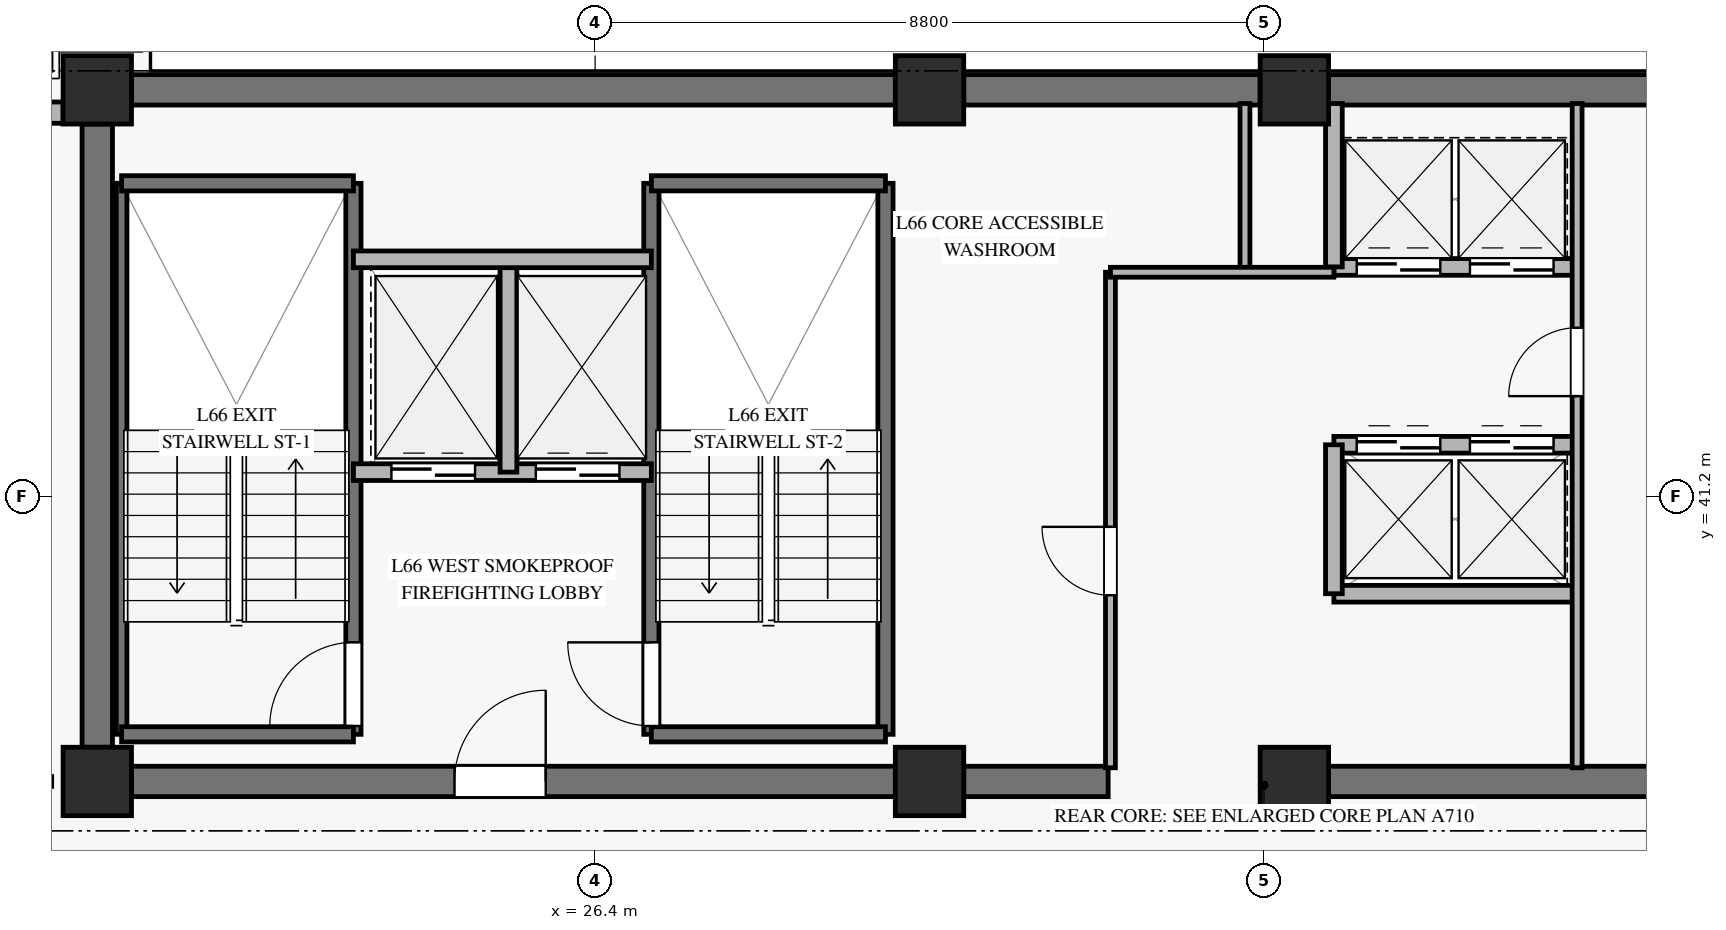
"""IFC4 building model, lengths in metres.
Left out: names, types, materials, properties, quantities, classifications, styles, units other than length and angle.
Written with IfcOpenShell. Run it as: python <this file> out.ifc"""

import sys

from ifc_helpers import new_model, si_unit, direction, frame, frame_2d, origin, origin_2d, place, context, subcontext, project, spatial, rectangle, extrude, source, transform, mapped, element, fill, save


model = new_model("IFC4")
c1 = context("Model", 3, precision=1e-05, world=origin(), true_north=direction((0.0, 1.0)))
c2 = subcontext(c1, "Body", "Model", "MODEL_VIEW")
j1 = project(units=[si_unit("LENGTHUNIT", "METRE"), si_unit("PLANEANGLEUNIT", "RADIAN")], contexts=[c1])
p1 = place(None, origin())
s1 = spatial("IfcSite", under=j1, at=p1, CompositionType="ELEMENT")
p2 = place(p1, origin())
s2 = spatial("IfcBuilding", under=s1, at=p2, CompositionType="ELEMENT")
p3 = place(p2, frame((0.0, 0.0, 258.7)))
s3 = spatial("IfcBuildingStorey", under=s2, at=p3, CompositionType="ELEMENT", Elevation=258.7)
m1 = source(origin(), c2, "Body", "SweptSolid", [
    extrude(rectangle(XDim=0.9, YDim=0.9, at=origin_2d()), origin(), (0.0, 0.0, 1.0), 3.185),
])
for number, where, z_axis, x_axis in (
    (1, (19.85, 37.45, 0.0), (0.0, 0.0, 1.0), (1.0, 0.0, 0.0)),
    (2, (19.85, 46.55, 0.0), (0.0, 0.0, 1.0), (1.0, 0.0, 0.0)),
    (3, (30.8, 37.45, 0.0), (0.0, 0.0, 1.0), (1.0, 0.0, 0.0)),
    (4, (30.8, 46.55, 0.0), (0.0, 0.0, 1.0), (1.0, 0.0, 0.0)),
    (5, (35.6, 37.45, 0.0), (0.0, 0.0, 1.0), (1.0, 0.0, 0.0)),
    (6, (35.6, 46.55, 0.0), (0.0, 0.0, 1.0), (1.0, 0.0, 0.0)),
):
    element("IfcColumn", number, at=place(p3, frame(where, z_axis=z_axis, x_axis=x_axis)), inside=s3, PredefinedType="PILASTER", context=c2, shape_type="MappedRepresentation", body=[
        mapped(m1, transform((0.0, 0.0, 0.0), x_axis=(1.0, 0.0, 0.0), y_axis=(0.0, 1.0, 0.0), z_axis=(0.0, 0.0, 1.0), scale=1.0)),
    ])
p4 = place(p3, frame((20.3, 46.55, 0.0), z_axis=(0.0, 0.0, 1.0), x_axis=(1.0, 0.0, 0.0)))
e7 = element("IfcWall", 7, at=p4, inside=s3, PredefinedType="SHEAR", context=c2, shape_type="SweptSolid", body=[
    extrude(rectangle(XDim=10.05, YDim=0.4, at=frame_2d((5.025, 0.0))), origin(), (0.0, 0.0, 1.0), 3.185),
])
p5 = place(p3, frame((31.25, 46.55, 0.0), z_axis=(0.0, 0.0, 1.0), x_axis=(1.0, 0.0, 0.0)))
e8 = element("IfcWall", 8, at=p5, inside=s3, PredefinedType="SHEAR", context=c2, shape_type="SweptSolid", body=[
    extrude(rectangle(XDim=3.9, YDim=0.4, at=frame_2d((1.95, 0.0))), origin(), (0.0, 0.0, 1.0), 3.185),
])
p6 = place(p3, frame((36.05, 46.55, 0.0), z_axis=(0.0, 0.0, 1.0), x_axis=(1.0, 0.0, 0.0)))
e9 = element("IfcWall", 9, at=p6, inside=s3, PredefinedType="SHEAR", context=c2, shape_type="SweptSolid", body=[
    extrude(rectangle(XDim=7.8, YDim=0.4, at=frame_2d((3.9, 0.0))), origin(), (0.0, 0.0, 1.0), 3.185),
])
p7 = place(p3, frame((20.3, 37.45, 0.0), z_axis=(0.0, 0.0, 1.0), x_axis=(1.0, 0.0, 0.0)))
e10 = element("IfcWall", 10, at=p7, inside=s3, PredefinedType="SHEAR", context=c2, shape_type="SweptSolid", body=[
    extrude(rectangle(XDim=10.05, YDim=0.4, at=frame_2d((5.025, 0.0))), origin(), (0.0, 0.0, 1.0), 3.185),
])
p8 = place(p7, frame((4.25, 0.0, 0.0)))
e11 = element("IfcOpeningElement", 11, at=p8, cuts=e10, PredefinedType="OPENING", context=c2, shape_type="SweptSolid", body=[
    extrude(rectangle(XDim=1.2, YDim=2.15, at=frame_2d((0.6, 1.075))), frame((0.0, 0.21, 0.0), z_axis=(0.0, -1.0, 0.0), x_axis=(1.0, 0.0, 0.0)), (0.0, 0.0, 1.0), 0.42),
])
p9 = place(p3, frame((31.25, 37.45, 0.0), z_axis=(0.0, 0.0, 1.0), x_axis=(1.0, 0.0, 0.0)))
e12 = element("IfcWall", 12, at=p9, inside=s3, PredefinedType="SHEAR", context=c2, shape_type="SweptSolid", body=[
    extrude(rectangle(XDim=1.9, YDim=0.4, at=frame_2d((0.95, 0.0))), origin(), (0.0, 0.0, 1.0), 3.185),
])
p10 = place(p3, frame((36.05, 37.45, 0.0), z_axis=(0.0, 0.0, 1.0), x_axis=(1.0, 0.0, 0.0)))
e13 = element("IfcWall", 13, at=p10, inside=s3, PredefinedType="SHEAR", context=c2, shape_type="SweptSolid", body=[
    extrude(rectangle(XDim=7.8, YDim=0.4, at=frame_2d((3.9, 0.0))), origin(), (0.0, 0.0, 1.0), 3.185),
])
p11 = place(p3, frame((19.85, 37.9, 0.0), z_axis=(0.0, 0.0, 1.0), x_axis=(0.0, 1.0, 0.0)))
e14 = element("IfcWall", 14, at=p11, inside=s3, PredefinedType="SHEAR", context=c2, shape_type="SweptSolid", body=[
    extrude(rectangle(XDim=8.2, YDim=0.4, at=frame_2d((4.1, 0.0))), origin(), (0.0, 0.0, 1.0), 3.185),
])
p12 = place(p3, frame((11.598, 46.25, 0.0), z_axis=(0.0, 0.0, 1.0), x_axis=(1.0, 0.0, 0.0)))
e15 = element("IfcWall", 15, at=p12, inside=s3, PredefinedType="SOLIDWALL", context=c2, shape_type="SweptSolid", body=[
    extrude(rectangle(XDim=7.802, YDim=0.28, at=frame_2d((3.901, 0.0))), origin(), (0.0, 0.0, 1.0), 2.815),
])
p13 = place(p12, frame((3.101, 0.0, 0.45)))
e16 = element("IfcOpeningElement", 16, at=p13, cuts=e15, PredefinedType="OPENING", context=c2, shape_type="SweptSolid", body=[
    extrude(rectangle(XDim=1.6, YDim=2.0, at=frame_2d((0.8, 1.0))), frame((0.0, 0.15, 0.0), z_axis=(0.0, -1.0, 0.0), x_axis=(1.0, 0.0, 0.0)), (0.0, 0.0, 1.0), 0.3),
])
p14 = place(p3, frame((20.17, 38.07, 0.0), z_axis=(0.0, 0.0, 1.0), x_axis=(0.0, 1.0, 0.0)))
e17 = element("IfcWall", 17, at=p14, inside=s3, PredefinedType="SOLIDWALL", context=c2, shape_type="SweptSolid", body=[
    extrude(rectangle(XDim=7.25, YDim=0.14, at=frame_2d((3.625, 0.0))), origin(), (0.0, 0.0, 1.0), 3.4),
])
p15 = place(p3, frame((23.22, 38.07, 0.0), z_axis=(0.0, 0.0, 1.0), x_axis=(0.0, 1.0, 0.0)))
e18 = element("IfcWall", 18, at=p15, inside=s3, PredefinedType="SOLIDWALL", context=c2, shape_type="SweptSolid", body=[
    extrude(rectangle(XDim=7.25, YDim=0.2, at=frame_2d((3.625, 0.0))), origin(), (0.0, 0.0, 1.0), 3.4),
])
p16 = place(p15, frame((0.11, 0.0, 0.0)))
e19 = element("IfcOpeningElement", 19, at=p16, cuts=e18, PredefinedType="OPENING", context=c2, shape_type="SweptSolid", body=[
    extrude(rectangle(XDim=1.1, YDim=2.15, at=frame_2d((0.55, 1.075))), frame((0.0, 0.11, 0.0), z_axis=(0.0, -1.0, 0.0), x_axis=(1.0, 0.0, 0.0)), (0.0, 0.0, 1.0), 0.22),
])
for number, where, z_axis, x_axis in (
    (20, (20.17, 45.32, 0.0), (0.0, 0.0, 1.0), (1.0, 0.0, 0.0)),
    (21, (20.17, 38.07, 0.0), (0.0, 0.0, 1.0), (1.0, 0.0, 0.0)),
):
    element("IfcWall", number, at=place(p3, frame(where, z_axis=z_axis, x_axis=x_axis)), inside=s3, PredefinedType="SOLIDWALL", context=c2, shape_type="SweptSolid", body=[
        extrude(rectangle(XDim=3.05, YDim=0.2, at=frame_2d((1.525, 0.0))), origin(), (0.0, 0.0, 1.0), 3.4),
    ])
p17 = place(p3, frame((27.14, 38.07, 0.0), z_axis=(0.0, 0.0, 1.0), x_axis=(0.0, 1.0, 0.0)))
e22 = element("IfcWall", 22, at=p17, inside=s3, PredefinedType="SOLIDWALL", context=c2, shape_type="SweptSolid", body=[
    extrude(rectangle(XDim=7.25, YDim=0.2, at=frame_2d((3.625, 0.0))), origin(), (0.0, 0.0, 1.0), 3.4),
])
p18 = place(p17, frame((0.11, 0.0, 0.0)))
e23 = element("IfcOpeningElement", 23, at=p18, cuts=e22, PredefinedType="OPENING", context=c2, shape_type="SweptSolid", body=[
    extrude(rectangle(XDim=1.1, YDim=2.15, at=frame_2d((0.55, 1.075))), frame((0.0, 0.11, 0.0), z_axis=(0.0, -1.0, 0.0), x_axis=(1.0, 0.0, 0.0)), (0.0, 0.0, 1.0), 0.22),
])
p19 = place(p3, frame((30.22, 38.07, 0.0), z_axis=(0.0, 0.0, 1.0), x_axis=(0.0, 1.0, 0.0)))
e24 = element("IfcWall", 24, at=p19, inside=s3, PredefinedType="SOLIDWALL", context=c2, shape_type="SweptSolid", body=[
    extrude(rectangle(XDim=7.25, YDim=0.2, at=frame_2d((3.625, 0.0))), origin(), (0.0, 0.0, 1.0), 3.4),
])
for number, where, z_axis, x_axis in (
    (25, (27.14, 45.32, 0.0), (0.0, 0.0, 1.0), (1.0, 0.0, 0.0)),
    (26, (27.14, 38.07, 0.0), (0.0, 0.0, 1.0), (1.0, 0.0, 0.0)),
):
    element("IfcWall", number, at=place(p3, frame(where, z_axis=z_axis, x_axis=x_axis)), inside=s3, PredefinedType="SOLIDWALL", context=c2, shape_type="SweptSolid", body=[
        extrude(rectangle(XDim=3.08, YDim=0.2, at=frame_2d((1.54, 0.0))), origin(), (0.0, 0.0, 1.0), 3.4),
    ])
p20 = place(p3, frame((23.22, 41.52, 0.0), z_axis=(0.0, 0.0, 1.0), x_axis=(1.0, 0.0, 0.0)))
e27 = element("IfcWall", 27, at=p20, inside=s3, PredefinedType="SOLIDWALL", context=c2, shape_type="SweptSolid", body=[
    extrude(rectangle(XDim=3.92, YDim=0.22, at=frame_2d((1.96, 0.0))), origin(), (0.0, 0.0, 1.0), 3.185),
])
p21 = place(p20, frame((0.5, 0.0, 0.0)))
e28 = element("IfcOpeningElement", 28, at=p21, cuts=e27, PredefinedType="OPENING", context=c2, shape_type="SweptSolid", body=[
    extrude(rectangle(XDim=1.1, YDim=2.2, at=frame_2d((0.55, 1.1))), frame((0.0, 0.12, 0.0), z_axis=(0.0, -1.0, 0.0), x_axis=(1.0, 0.0, 0.0)), (0.0, 0.0, 1.0), 0.24),
])
p22 = place(p20, frame((2.4, 0.0, 0.0)))
e29 = element("IfcOpeningElement", 29, at=p22, cuts=e27, PredefinedType="OPENING", context=c2, shape_type="SweptSolid", body=[
    extrude(rectangle(XDim=1.1, YDim=2.2, at=frame_2d((0.55, 1.1))), frame((0.0, 0.12, 0.0), z_axis=(0.0, -1.0, 0.0), x_axis=(1.0, 0.0, 0.0)), (0.0, 0.0, 1.0), 0.24),
])
p23 = place(p3, frame((25.26, 41.52, 0.0), z_axis=(0.0, 0.0, 1.0), x_axis=(0.0, 1.0, 0.0)))
e30 = element("IfcWall", 30, at=p23, inside=s3, PredefinedType="SOLIDWALL", context=c2, shape_type="SweptSolid", body=[
    extrude(rectangle(XDim=2.8, YDim=0.22, at=frame_2d((1.4, 0.0))), origin(), (0.0, 0.0, 1.0), 3.185),
])
p24 = place(p3, frame((23.22, 44.32, 0.0), z_axis=(0.0, 0.0, 1.0), x_axis=(1.0, 0.0, 0.0)))
e31 = element("IfcWall", 31, at=p24, inside=s3, PredefinedType="SOLIDWALL", context=c2, shape_type="SweptSolid", body=[
    extrude(rectangle(XDim=3.92, YDim=0.22, at=frame_2d((1.96, 0.0))), origin(), (0.0, 0.0, 1.0), 3.185),
])
p25 = place(p3, frame((36.12, 44.22, 0.0), z_axis=(0.0, 0.0, 1.0), x_axis=(1.0, 0.0, 0.0)))
e32 = element("IfcWall", 32, at=p25, inside=s3, PredefinedType="SOLIDWALL", context=c2, shape_type="SweptSolid", body=[
    extrude(rectangle(XDim=3.2, YDim=0.22, at=frame_2d((1.6, 0.0))), origin(), (0.0, 0.0, 1.0), 3.185),
])
p26 = place(p25, frame((0.3, 0.0, 0.0)))
e33 = element("IfcOpeningElement", 33, at=p26, cuts=e32, PredefinedType="OPENING", context=c2, shape_type="SweptSolid", body=[
    extrude(rectangle(XDim=1.1, YDim=2.2, at=frame_2d((0.55, 1.1))), frame((0.0, 0.12, 0.0), z_axis=(0.0, -1.0, 0.0), x_axis=(1.0, 0.0, 0.0)), (0.0, 0.0, 1.0), 0.24),
])
p27 = place(p25, frame((1.79, 0.0, 0.0)))
e34 = element("IfcOpeningElement", 34, at=p27, cuts=e32, PredefinedType="OPENING", context=c2, shape_type="SweptSolid", body=[
    extrude(rectangle(XDim=1.1, YDim=2.2, at=frame_2d((0.55, 1.1))), frame((0.0, 0.12, 0.0), z_axis=(0.0, -1.0, 0.0), x_axis=(1.0, 0.0, 0.0)), (0.0, 0.0, 1.0), 0.24),
])
p28 = place(p3, frame((36.12, 41.88, 0.0), z_axis=(0.0, 0.0, 1.0), x_axis=(1.0, 0.0, 0.0)))
e35 = element("IfcWall", 35, at=p28, inside=s3, PredefinedType="SOLIDWALL", context=c2, shape_type="SweptSolid", body=[
    extrude(rectangle(XDim=3.2, YDim=0.22, at=frame_2d((1.6, 0.0))), origin(), (0.0, 0.0, 1.0), 3.185),
])
p29 = place(p28, frame((0.3, 0.0, 0.0)))
e36 = element("IfcOpeningElement", 36, at=p29, cuts=e35, PredefinedType="OPENING", context=c2, shape_type="SweptSolid", body=[
    extrude(rectangle(XDim=1.1, YDim=2.2, at=frame_2d((0.55, 1.1))), frame((0.0, 0.12, 0.0), z_axis=(0.0, -1.0, 0.0), x_axis=(1.0, 0.0, 0.0)), (0.0, 0.0, 1.0), 0.24),
])
p30 = place(p28, frame((1.79, 0.0, 0.0)))
e37 = element("IfcOpeningElement", 37, at=p30, cuts=e35, PredefinedType="OPENING", context=c2, shape_type="SweptSolid", body=[
    extrude(rectangle(XDim=1.1, YDim=2.2, at=frame_2d((0.55, 1.1))), frame((0.0, 0.12, 0.0), z_axis=(0.0, -1.0, 0.0), x_axis=(1.0, 0.0, 0.0)), (0.0, 0.0, 1.0), 0.24),
])
p31 = place(p3, frame((36.12, 39.92, 0.0), z_axis=(0.0, 0.0, 1.0), x_axis=(1.0, 0.0, 0.0)))
e38 = element("IfcWall", 38, at=p31, inside=s3, PredefinedType="SOLIDWALL", context=c2, shape_type="SweptSolid", body=[
    extrude(rectangle(XDim=3.2, YDim=0.22, at=frame_2d((1.6, 0.0))), origin(), (0.0, 0.0, 1.0), 3.185),
])
p32 = place(p3, frame((36.12, 39.92, 0.0), z_axis=(0.0, 0.0, 1.0), x_axis=(0.0, 1.0, 0.0)))
e39 = element("IfcWall", 39, at=p32, inside=s3, PredefinedType="SOLIDWALL", context=c2, shape_type="SweptSolid", body=[
    extrude(rectangle(XDim=1.96, YDim=0.22, at=frame_2d((0.98, 0.0))), origin(), (0.0, 0.0, 1.0), 3.185),
])
p33 = place(p3, frame((36.12, 44.22, 0.0), z_axis=(0.0, 0.0, 1.0), x_axis=(0.0, 1.0, 0.0)))
e40 = element("IfcWall", 40, at=p33, inside=s3, PredefinedType="SOLIDWALL", context=c2, shape_type="SweptSolid", body=[
    extrude(rectangle(XDim=2.15, YDim=0.22, at=frame_2d((1.075, 0.0))), origin(), (0.0, 0.0, 1.0), 3.185),
])
p34 = place(p3, frame((33.18, 37.63, 0.0), z_axis=(0.0, 0.0, 1.0), x_axis=(0.0, 1.0, 0.0)))
e41 = element("IfcWall", 41, at=p34, inside=s3, PredefinedType="PARTITIONING", context=c2, shape_type="SweptSolid", body=[
    extrude(rectangle(XDim=6.52, YDim=0.13, at=frame_2d((3.26, 0.0))), origin(), (0.0, 0.0, 1.0), 2.27),
])
p35 = place(p34, frame((2.27, 0.0, 0.0)))
e42 = element("IfcOpeningElement", 42, at=p35, cuts=e41, PredefinedType="OPENING", context=c2, shape_type="SweptSolid", body=[
    extrude(rectangle(XDim=0.9, YDim=2.1, at=frame_2d((0.45, 1.05))), frame((0.0, 0.075, 0.0), z_axis=(0.0, -1.0, 0.0), x_axis=(1.0, 0.0, 0.0)), (0.0, 0.0, 1.0), 0.15),
])
p36 = place(p3, frame((34.95, 44.15, 0.0), z_axis=(0.0, 0.0, 1.0), x_axis=(0.0, 1.0, 0.0)))
e43 = element("IfcWall", 43, at=p36, inside=s3, PredefinedType="PARTITIONING", context=c2, shape_type="SweptSolid", body=[
    extrude(rectangle(XDim=2.22, YDim=0.13, at=frame_2d((1.11, 0.0))), origin(), (0.0, 0.0, 1.0), 3.185),
])
p37 = place(p3, frame((33.18, 44.15, 0.0), z_axis=(0.0, 0.0, 1.0), x_axis=(1.0, 0.0, 0.0)))
e44 = element("IfcWall", 44, at=p37, inside=s3, PredefinedType="PARTITIONING", context=c2, shape_type="SweptSolid", body=[
    extrude(rectangle(XDim=2.94, YDim=0.13, at=frame_2d((1.47, 0.0))), origin(), (0.0, 0.0, 1.0), 2.47),
])
p38 = place(p3, frame((39.32, 37.63, 0.0), z_axis=(0.0, 0.0, 1.0), x_axis=(0.0, 1.0, 0.0)))
e45 = element("IfcWall", 45, at=p38, inside=s3, PredefinedType="PARTITIONING", context=c2, shape_type="SweptSolid", body=[
    extrude(rectangle(XDim=8.74, YDim=0.13, at=frame_2d((4.37, 0.0))), origin(), (0.0, 0.0, 1.0), 3.185),
])
p39 = place(p38, frame((4.89, 0.0, 0.0)))
e46 = element("IfcOpeningElement", 46, at=p39, cuts=e45, PredefinedType="OPENING", context=c2, shape_type="SweptSolid", body=[
    extrude(rectangle(XDim=0.9, YDim=2.1, at=frame_2d((0.45, 1.05))), frame((0.0, 0.075, 0.0), z_axis=(0.0, -1.0, 0.0), x_axis=(1.0, 0.0, 0.0)), (0.0, 0.0, 1.0), 0.15),
])
m2 = source(origin(), c2, "Body", "SweptSolid", [
    extrude(rectangle(XDim=1.1, YDim=2.15, at=frame_2d((0.55, 1.075))), frame((0.0, 0.025, 0.0), z_axis=(0.0, -1.0, 0.0), x_axis=(1.0, 0.0, 0.0)), (0.0, 0.0, 1.0), 0.05),
])
p40 = place(p16, origin())
e47 = element("IfcDoor", 47, at=p40, inside=s3, OperationType="SINGLE_SWING_LEFT", PredefinedType="DOOR", context=c2, shape_type="MappedRepresentation", body=[
    mapped(m2, transform((0.0, 0.0, 0.0), x_axis=(1.0, 0.0, 0.0), y_axis=(0.0, 1.0, 0.0), z_axis=(0.0, 0.0, 1.0), scale=1.0)),
])
fill(e19, e47)
p41 = place(p18, origin())
e48 = element("IfcDoor", 48, at=p41, inside=s3, OperationType="SINGLE_SWING_RIGHT", PredefinedType="DOOR", context=c2, shape_type="MappedRepresentation", body=[
    mapped(m2, transform((0.0, 0.0, 0.0), x_axis=(1.0, 0.0, 0.0), y_axis=(0.0, 1.0, 0.0), z_axis=(0.0, 0.0, 1.0), scale=1.0)),
])
fill(e23, e48)
m3 = source(origin(), c2, "Body", "SweptSolid", [
    extrude(rectangle(XDim=1.1, YDim=2.2, at=frame_2d((0.55, 1.1))), frame((0.0, 0.025, 0.0), z_axis=(0.0, -1.0, 0.0), x_axis=(1.0, 0.0, 0.0)), (0.0, 0.0, 1.0), 0.05),
])
p42 = place(p21, origin())
e49 = element("IfcDoor", 49, at=p42, inside=s3, OperationType="SLIDING_TO_LEFT", PredefinedType="DOOR", context=c2, shape_type="MappedRepresentation", body=[
    mapped(m3, transform((0.0, 0.0, 0.0), x_axis=(1.0, 0.0, 0.0), y_axis=(0.0, 1.0, 0.0), z_axis=(0.0, 0.0, 1.0), scale=1.0)),
])
fill(e28, e49)
p43 = place(p22, origin())
e50 = element("IfcDoor", 50, at=p43, inside=s3, OperationType="SLIDING_TO_LEFT", PredefinedType="DOOR", context=c2, shape_type="MappedRepresentation", body=[
    mapped(m3, transform((0.0, 0.0, 0.0), x_axis=(1.0, 0.0, 0.0), y_axis=(0.0, 1.0, 0.0), z_axis=(0.0, 0.0, 1.0), scale=1.0)),
])
fill(e29, e50)
m4 = source(origin(), c2, "Body", "SweptSolid", [
    extrude(rectangle(XDim=1.2, YDim=2.15, at=frame_2d((0.6, 1.075))), frame((0.0, 0.025, 0.0), z_axis=(0.0, -1.0, 0.0), x_axis=(1.0, 0.0, 0.0)), (0.0, 0.0, 1.0), 0.05),
])
p44 = place(p8, origin())
e51 = element("IfcDoor", 51, at=p44, inside=s3, OperationType="SINGLE_SWING_RIGHT", PredefinedType="DOOR", context=c2, shape_type="MappedRepresentation", body=[
    mapped(m4, transform((0.0, 0.0, 0.0), x_axis=(1.0, 0.0, 0.0), y_axis=(0.0, 1.0, 0.0), z_axis=(0.0, 0.0, 1.0), scale=1.0)),
])
fill(e11, e51)
p45 = place(p26, origin())
e52 = element("IfcDoor", 52, at=p45, inside=s3, OperationType="SLIDING_TO_LEFT", PredefinedType="DOOR", context=c2, shape_type="MappedRepresentation", body=[
    mapped(m3, transform((0.0, 0.0, 0.0), x_axis=(1.0, 0.0, 0.0), y_axis=(0.0, 1.0, 0.0), z_axis=(0.0, 0.0, 1.0), scale=1.0)),
])
fill(e33, e52)
p46 = place(p27, origin())
e53 = element("IfcDoor", 53, at=p46, inside=s3, OperationType="SLIDING_TO_LEFT", PredefinedType="DOOR", context=c2, shape_type="MappedRepresentation", body=[
    mapped(m3, transform((0.0, 0.0, 0.0), x_axis=(1.0, 0.0, 0.0), y_axis=(0.0, 1.0, 0.0), z_axis=(0.0, 0.0, 1.0), scale=1.0)),
])
fill(e34, e53)
p47 = place(p29, origin())
e54 = element("IfcDoor", 54, at=p47, inside=s3, OperationType="SLIDING_TO_LEFT", PredefinedType="DOOR", context=c2, shape_type="MappedRepresentation", body=[
    mapped(m3, transform((0.0, 0.0, 0.0), x_axis=(1.0, 0.0, 0.0), y_axis=(0.0, 1.0, 0.0), z_axis=(0.0, 0.0, 1.0), scale=1.0)),
])
fill(e36, e54)
p48 = place(p30, origin())
e55 = element("IfcDoor", 55, at=p48, inside=s3, OperationType="SLIDING_TO_LEFT", PredefinedType="DOOR", context=c2, shape_type="MappedRepresentation", body=[
    mapped(m3, transform((0.0, 0.0, 0.0), x_axis=(1.0, 0.0, 0.0), y_axis=(0.0, 1.0, 0.0), z_axis=(0.0, 0.0, 1.0), scale=1.0)),
])
fill(e37, e55)
m5 = source(origin(), c2, "Body", "SweptSolid", [
    extrude(rectangle(XDim=0.9, YDim=2.1, at=frame_2d((0.45, 1.05))), frame((0.0, 0.025, 0.0), z_axis=(0.0, -1.0, 0.0), x_axis=(1.0, 0.0, 0.0)), (0.0, 0.0, 1.0), 0.05),
])
p49 = place(p35, origin())
e56 = element("IfcDoor", 56, at=p49, inside=s3, OperationType="SINGLE_SWING_RIGHT", PredefinedType="DOOR", context=c2, shape_type="MappedRepresentation", body=[
    mapped(m5, transform((0.0, 0.0, 0.0), x_axis=(1.0, 0.0, 0.0), y_axis=(0.0, 1.0, 0.0), z_axis=(0.0, 0.0, 1.0), scale=1.0)),
])
fill(e42, e56)
p50 = place(p39, origin())
e57 = element("IfcDoor", 57, at=p50, inside=s3, OperationType="SINGLE_SWING_LEFT", PredefinedType="DOOR", context=c2, shape_type="MappedRepresentation", body=[
    mapped(m5, transform((0.0, 0.0, 0.0), x_axis=(1.0, 0.0, 0.0), y_axis=(0.0, 1.0, 0.0), z_axis=(0.0, 0.0, 1.0), scale=1.0)),
])
fill(e46, e57)
save(model, sys.argv[1])
